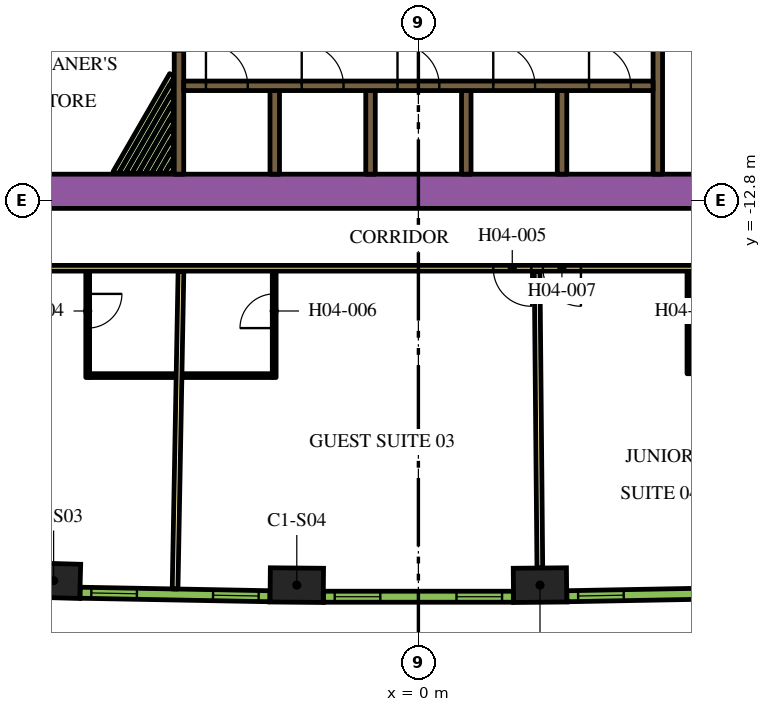
"""IFC4 building model, lengths in metres.
Left out: names, types, materials, properties, quantities, classifications, styles, units other than length and angle.
Written with IfcOpenShell. Run it as: python <this file> out.ifc"""

import sys

from ifc_helpers import new_model, si_unit, direction, frame, frame_2d, origin, origin_2d, place, context, subcontext, project, spatial, rectangle, extrude, element, fill, save


model = new_model("IFC4")
c1 = context("Model", 3, precision=1e-05, world=origin(), true_north=direction((0.0, 1.0)))
c2 = subcontext(c1, "Body", "Model", "MODEL_VIEW")
j1 = project(units=[si_unit("LENGTHUNIT", "METRE"), si_unit("PLANEANGLEUNIT", "RADIAN")], contexts=[c1])
p1 = place(None, origin())
s1 = spatial("IfcSite", under=j1, at=p1, CompositionType="ELEMENT")
p2 = place(p1, origin())
s2 = spatial("IfcBuilding", under=s1, at=p2, CompositionType="ELEMENT")
p3 = place(p2, frame((0.0, 0.0, 70.5)))
s3 = spatial("IfcBuildingStorey", under=s2, at=p3, CompositionType="ELEMENT", Elevation=70.5)
for number, where, z_axis, x_axis in (
    (1, (-9.599, -22.795, 0.0), (0.0, 0.0, 1.0), (1.0, -0.028, 0.0)),
    (2, (-3.2, -22.913, 0.0), (0.0, 0.0, 1.0), (1.0, -0.009, 0.0)),
    (3, (3.2, -22.913, 0.0), (0.0, 0.0, 1.0), (1.0, 0.009, 0.0)),
):
    element("IfcColumn", number, at=place(p3, frame(where, z_axis=z_axis, x_axis=x_axis)), inside=s3, PredefinedType="COLUMN", context=c2, shape_type="SweptSolid", body=[
        extrude(rectangle(XDim=1.4, YDim=0.9, at=origin_2d()), origin(), (0.0, 0.0, 1.0), 3.9),
    ])
p4 = place(p3, frame((-12.019, -12.55, 0.0), z_axis=(0.0, 0.0, 1.0), x_axis=(1.0, 0.0, 0.0)))
e4 = element("IfcWall", 4, at=p4, inside=s3, PredefinedType="SOLIDWALL", context=c2, shape_type="SweptSolid", body=[
    extrude(rectangle(XDim=21.63, YDim=0.9, at=frame_2d((10.815, 0.0))), origin(), (0.0, 0.0, 1.0), 3.9),
])
p5 = place(p3, frame((12.84, -9.261, 0.0), z_axis=(0.0, 0.0, 1.0), x_axis=(-0.866013990052, 0.500019768644, 0.0)))
e5 = element("IfcWall", 5, at=p5, inside=s3, PredefinedType="SOLIDWALL", context=c2, shape_type="SweptSolid", body=[
    extrude(rectangle(XDim=6.8, YDim=0.25, at=frame_2d((3.4, 0.0))), origin(), (0.0, 0.0, 1.0), 3.9),
])
p6 = place(p3, frame((-12.84, -9.261, 0.0), z_axis=(0.0, 0.0, 1.0), x_axis=(0.866016039709, 0.500016218704, 0.0)))
e6 = element("IfcWall", 6, at=p6, inside=s3, PredefinedType="SOLIDWALL", context=c2, shape_type="SweptSolid", body=[
    extrude(rectangle(XDim=7.05, YDim=0.25, at=frame_2d((3.525, 0.0))), origin(), (0.0, 0.0, 1.0), 3.9),
])
p7 = place(p3, frame((-3.78, -12.1, 0.0), z_axis=(0.0, 0.0, 1.0), x_axis=(0.0, 1.0, 0.0)))
e7 = element("IfcWall", 7, at=p7, inside=s3, PredefinedType="SOLIDWALL", context=c2, shape_type="SweptSolid", body=[
    extrude(rectangle(XDim=2.2, YDim=0.25, at=frame_2d((1.1, 0.0))), origin(), (0.0, 0.0, 1.0), 3.9),
])
p8 = place(p3, frame((-6.3, -12.1, 0.0), z_axis=(0.0, 0.0, 1.0), x_axis=(0.0, 1.0, 0.0)))
e8 = element("IfcWall", 8, at=p8, inside=s3, PredefinedType="SOLIDWALL", context=c2, shape_type="SweptSolid", body=[
    extrude(rectangle(XDim=3.265, YDim=0.25, at=frame_2d((1.632, 0.0))), origin(), (0.0, 0.0, 1.0), 3.9),
])
p9 = place(p3, frame((6.3, -12.1, 0.0), z_axis=(0.0, 0.0, 1.0), x_axis=(0.0, 1.0, 0.0)))
e9 = element("IfcWall", 9, at=p9, inside=s3, PredefinedType="SOLIDWALL", context=c2, shape_type="SweptSolid", body=[
    extrude(rectangle(XDim=3.428, YDim=0.25, at=frame_2d((1.714, 0.0))), origin(), (0.0, 0.0, 1.0), 3.9),
])
for number, where, z_axis, x_axis in (
    (10, (3.78, -12.1, 0.0), (0.0, 0.0, 1.0), (0.0, 1.0, 0.0)),
    (11, (1.26, -12.1, 0.0), (0.0, 0.0, 1.0), (0.0, 1.0, 0.0)),
    (12, (-1.26, -12.1, 0.0), (0.0, 0.0, 1.0), (0.0, 1.0, 0.0)),
):
    element("IfcWall", number, at=place(p3, frame(where, z_axis=z_axis, x_axis=x_axis)), inside=s3, PredefinedType="SOLIDWALL", context=c2, shape_type="SweptSolid", body=[
        extrude(rectangle(XDim=2.2, YDim=0.25, at=frame_2d((1.1, 0.0))), origin(), (0.0, 0.0, 1.0), 3.9),
    ])
p10 = place(p3, frame((-7.968, -12.068, 0.0), z_axis=(0.0, 0.0, 1.0), x_axis=(0.500013701029, 0.866017493347, 0.0)))
e13 = element("IfcWall", 13, at=p10, inside=s3, PredefinedType="PARTITIONING", context=c2, shape_type="SweptSolid", body=[
    extrude(rectangle(XDim=2.975, YDim=0.15, at=frame_2d((1.488, 0.0))), origin(), (0.0, 0.0, 1.0), 2.75),
])
p11 = place(p3, frame((-7.794, -12.068, 0.0), z_axis=(0.0, 0.0, 1.0), x_axis=(0.499985098601, 0.86603400694, 0.0)))
e14 = element("IfcWall", 14, at=p11, inside=s3, PredefinedType="PARTITIONING", context=c2, shape_type="SweptSolid", body=[
    extrude(rectangle(XDim=2.628, YDim=0.15, at=frame_2d((1.314, 0.0))), origin(), (0.0, 0.0, 1.0), 2.75),
])
p12 = place(p3, frame((-7.621, -12.068, 0.0), z_axis=(0.0, 0.0, 1.0), x_axis=(0.500028047758, 0.866009209798, 0.0)))
e15 = element("IfcWall", 15, at=p12, inside=s3, PredefinedType="PARTITIONING", context=c2, shape_type="SweptSolid", body=[
    extrude(rectangle(XDim=2.282, YDim=0.15, at=frame_2d((1.141, 0.0))), origin(), (0.0, 0.0, 1.0), 2.75),
])
p13 = place(p3, frame((-7.448, -12.068, 0.0), z_axis=(0.0, 0.0, 1.0), x_axis=(0.500031751504, 0.866007071269, 0.0)))
e16 = element("IfcWall", 16, at=p13, inside=s3, PredefinedType="PARTITIONING", context=c2, shape_type="SweptSolid", body=[
    extrude(rectangle(XDim=1.936, YDim=0.15, at=frame_2d((0.968, 0.0))), origin(), (0.0, 0.0, 1.0), 2.75),
])
p14 = place(p3, frame((-7.275, -12.068, 0.0), z_axis=(0.0, 0.0, 1.0), x_axis=(0.499988385283, 0.86603210944, 0.0)))
e17 = element("IfcWall", 17, at=p14, inside=s3, PredefinedType="PARTITIONING", context=c2, shape_type="SweptSolid", body=[
    extrude(rectangle(XDim=1.589, YDim=0.15, at=frame_2d((0.795, 0.0))), origin(), (0.0, 0.0, 1.0), 2.75),
])
p15 = place(p3, frame((-7.102, -12.068, 0.0), z_axis=(0.0, 0.0, 1.0), x_axis=(0.500068153333, 0.865986051864, 0.0)))
e18 = element("IfcWall", 18, at=p15, inside=s3, PredefinedType="PARTITIONING", context=c2, shape_type="SweptSolid", body=[
    extrude(rectangle(XDim=1.243, YDim=0.15, at=frame_2d((0.622, 0.0))), origin(), (0.0, 0.0, 1.0), 2.75),
])
p16 = place(p3, frame((-6.928, -12.068, 0.0), z_axis=(0.0, 0.0, 1.0), x_axis=(0.500005339912, 0.866022320763, 0.0)))
e19 = element("IfcWall", 19, at=p16, inside=s3, PredefinedType="PARTITIONING", context=c2, shape_type="SweptSolid", body=[
    extrude(rectangle(XDim=0.896, YDim=0.15, at=frame_2d((0.448, 0.0))), origin(), (0.0, 0.0, 1.0), 2.75),
])
p17 = place(p3, frame((-6.755, -12.068, 0.0), z_axis=(0.0, 0.0, 1.0), x_axis=(0.500196256984, 0.865912065108, 0.0)))
e20 = element("IfcWall", 20, at=p17, inside=s3, PredefinedType="PARTITIONING", context=c2, shape_type="SweptSolid", body=[
    extrude(rectangle(XDim=0.55, YDim=0.15, at=frame_2d((0.275, 0.0))), origin(), (0.0, 0.0, 1.0), 2.75),
])
p18 = place(p3, frame((-6.582, -12.068, 0.0), z_axis=(0.0, 0.0, 1.0), x_axis=(0.499618727529, 0.866245419672, 0.0)))
e21 = element("IfcWall", 21, at=p18, inside=s3, PredefinedType="PARTITIONING", context=c2, shape_type="SweptSolid", body=[
    extrude(rectangle(XDim=0.204, YDim=0.15, at=frame_2d((0.102, 0.0))), origin(), (0.0, 0.0, 1.0), 2.75),
])
p19 = place(p3, frame((-6.175, -9.775, 0.0), z_axis=(0.0, 0.0, 1.0), x_axis=(1.0, 0.0, 0.0)))
e22 = element("IfcWall", 22, at=p19, inside=s3, PredefinedType="SOLIDWALL", context=c2, shape_type="SweptSolid", body=[
    extrude(rectangle(XDim=12.35, YDim=0.25, at=frame_2d((6.175, 0.0))), origin(), (0.0, 0.0, 1.0), 3.9),
])
p20 = place(p19, frame((0.585, 0.0, 0.0)))
e23 = element("IfcOpeningElement", 23, at=p20, cuts=e22, PredefinedType="OPENING", context=c2, shape_type="SweptSolid", body=[
    extrude(rectangle(XDim=1.1, YDim=2.1, at=frame_2d((0.55, 1.05))), frame((0.0, 0.135, 0.0), z_axis=(0.0, -1.0, 0.0), x_axis=(1.0, 0.0, 0.0)), (0.0, 0.0, 1.0), 0.27),
])
p21 = place(p19, frame((3.105, 0.0, 0.0)))
e24 = element("IfcOpeningElement", 24, at=p21, cuts=e22, PredefinedType="OPENING", context=c2, shape_type="SweptSolid", body=[
    extrude(rectangle(XDim=1.1, YDim=2.1, at=frame_2d((0.55, 1.05))), frame((0.0, 0.135, 0.0), z_axis=(0.0, -1.0, 0.0), x_axis=(1.0, 0.0, 0.0)), (0.0, 0.0, 1.0), 0.27),
])
p22 = place(p19, frame((5.625, 0.0, 0.0)))
e25 = element("IfcOpeningElement", 25, at=p22, cuts=e22, PredefinedType="OPENING", context=c2, shape_type="SweptSolid", body=[
    extrude(rectangle(XDim=1.1, YDim=2.1, at=frame_2d((0.55, 1.05))), frame((0.0, 0.135, 0.0), z_axis=(0.0, -1.0, 0.0), x_axis=(1.0, 0.0, 0.0)), (0.0, 0.0, 1.0), 0.27),
])
p23 = place(p19, frame((8.145, 0.0, 0.0)))
e26 = element("IfcOpeningElement", 26, at=p23, cuts=e22, PredefinedType="OPENING", context=c2, shape_type="SweptSolid", body=[
    extrude(rectangle(XDim=1.1, YDim=2.1, at=frame_2d((0.55, 1.05))), frame((0.0, 0.135, 0.0), z_axis=(0.0, -1.0, 0.0), x_axis=(1.0, 0.0, 0.0)), (0.0, 0.0, 1.0), 0.27),
])
p24 = place(p19, frame((10.665, 0.0, 0.0)))
e27 = element("IfcOpeningElement", 27, at=p24, cuts=e22, PredefinedType="OPENING", context=c2, shape_type="SweptSolid", body=[
    extrude(rectangle(XDim=1.1, YDim=2.1, at=frame_2d((0.55, 1.05))), frame((0.0, 0.135, 0.0), z_axis=(0.0, -1.0, 0.0), x_axis=(1.0, 0.0, 0.0)), (0.0, 0.0, 1.0), 0.27),
])
p25 = place(p3, frame((12.918, -14.575, 0.0), z_axis=(0.0, 0.0, 1.0), x_axis=(-1.0, 0.0, 0.0)))
e28 = element("IfcWall", 28, at=p25, inside=s3, PredefinedType="PARTITIONING", context=c2, shape_type="SweptSolid", body=[
    extrude(rectangle(XDim=25.766, YDim=0.15, at=frame_2d((12.883, 0.0))), origin(), (0.0, 0.0, 1.0), 2.75),
])
p26 = place(p25, frame((24.586, 0.0, 0.0)))
e29 = element("IfcOpeningElement", 29, at=p26, cuts=e28, PredefinedType="OPENING", context=c2, shape_type="SweptSolid", body=[
    extrude(rectangle(XDim=1.0, YDim=2.1, at=frame_2d((0.5, 1.05))), frame((0.0, 0.085, 0.0), z_axis=(0.0, -1.0, 0.0), x_axis=(1.0, 0.0, 0.0)), (0.0, 0.0, 1.0), 0.17),
])
p27 = place(p25, frame((9.948, 0.0, 0.0)))
e30 = element("IfcOpeningElement", 30, at=p27, cuts=e28, PredefinedType="OPENING", context=c2, shape_type="SweptSolid", body=[
    extrude(rectangle(XDim=1.0, YDim=2.1, at=frame_2d((0.5, 1.05))), frame((0.0, 0.085, 0.0), z_axis=(0.0, -1.0, 0.0), x_axis=(1.0, 0.0, 0.0)), (0.0, 0.0, 1.0), 0.17),
])
p28 = place(p25, frame((8.642, 0.0, 0.0)))
e31 = element("IfcOpeningElement", 31, at=p28, cuts=e28, PredefinedType="OPENING", context=c2, shape_type="SweptSolid", body=[
    extrude(rectangle(XDim=1.0, YDim=2.1, at=frame_2d((0.5, 1.05))), frame((0.0, 0.085, 0.0), z_axis=(0.0, -1.0, 0.0), x_axis=(1.0, 0.0, 0.0)), (0.0, 0.0, 1.0), 0.17),
])
p29 = place(p25, frame((0.18, 0.0, 0.0)))
e32 = element("IfcOpeningElement", 32, at=p29, cuts=e28, PredefinedType="OPENING", context=c2, shape_type="SweptSolid", body=[
    extrude(rectangle(XDim=1.0, YDim=2.1, at=frame_2d((0.5, 1.05))), frame((0.0, 0.085, 0.0), z_axis=(0.0, -1.0, 0.0), x_axis=(1.0, 0.0, 0.0)), (0.0, 0.0, 1.0), 0.17),
])
p30 = place(p3, frame((-6.402, -23.014, 0.0), z_axis=(0.0, 0.0, 1.0), x_axis=(0.01849587109, 0.999828936745, 0.0)))
e33 = element("IfcWall", 33, at=p30, inside=s3, PredefinedType="PARTITIONING", context=c2, shape_type="SweptSolid", body=[
    extrude(rectangle(XDim=8.355, YDim=0.15, at=frame_2d((4.178, 0.0))), origin(), (0.0, 0.0, 1.0), 2.75),
])
p31 = place(p3, frame((3.196, -22.463, 0.0), z_axis=(0.0, 0.0, 1.0), x_axis=(-0.00926060032, 0.999957119721, 0.0)))
e34 = element("IfcWall", 34, at=p31, inside=s3, PredefinedType="PARTITIONING", context=c2, shape_type="SweptSolid", body=[
    extrude(rectangle(XDim=7.803, YDim=0.15, at=frame_2d((3.902, 0.0))), origin(), (0.0, 0.0, 1.0), 2.75),
])
p32 = place(p3, frame((-8.702, -14.65, 0.0), z_axis=(0.0, 0.0, 1.0), x_axis=(0.0, -1.0, 0.0)))
e35 = element("IfcWall", 35, at=p32, inside=s3, PredefinedType="PARTITIONING", context=c2, shape_type="SweptSolid", body=[
    extrude(rectangle(XDim=2.8, YDim=0.1, at=frame_2d((1.4, 0.0))), origin(), (0.0, 0.0, 1.0), 2.75),
])
p33 = place(p32, frame((0.6, 0.0, 0.0)))
e36 = element("IfcOpeningElement", 36, at=p33, cuts=e35, PredefinedType="OPENING", context=c2, shape_type="SweptSolid", body=[
    extrude(rectangle(XDim=0.9, YDim=2.1, at=frame_2d((0.45, 1.05))), frame((0.0, 0.06, 0.0), z_axis=(0.0, -1.0, 0.0), x_axis=(1.0, 0.0, 0.0)), (0.0, 0.0, 1.0), 0.12),
])
p34 = place(p3, frame((-8.652, -17.4, 0.0), z_axis=(0.0, 0.0, 1.0), x_axis=(1.0, 0.0, 0.0)))
e37 = element("IfcWall", 37, at=p34, inside=s3, PredefinedType="PARTITIONING", context=c2, shape_type="SweptSolid", body=[
    extrude(rectangle(XDim=2.27, YDim=0.1, at=frame_2d((1.135, 0.0))), origin(), (0.0, 0.0, 1.0), 2.75),
])
p35 = place(p3, frame((-3.794, -17.45, 0.0), z_axis=(0.0, 0.0, 1.0), x_axis=(0.0, 1.0, 0.0)))
e38 = element("IfcWall", 38, at=p35, inside=s3, PredefinedType="PARTITIONING", context=c2, shape_type="SweptSolid", body=[
    extrude(rectangle(XDim=2.8, YDim=0.1, at=frame_2d((1.4, 0.0))), origin(), (0.0, 0.0, 1.0), 2.75),
])
p36 = place(p35, frame((1.3, 0.0, 0.0)))
e39 = element("IfcOpeningElement", 39, at=p36, cuts=e38, PredefinedType="OPENING", context=c2, shape_type="SweptSolid", body=[
    extrude(rectangle(XDim=0.9, YDim=2.1, at=frame_2d((0.45, 1.05))), frame((0.0, 0.06, 0.0), z_axis=(0.0, -1.0, 0.0), x_axis=(1.0, 0.0, 0.0)), (0.0, 0.0, 1.0), 0.12),
])
p37 = place(p3, frame((-3.844, -17.4, 0.0), z_axis=(0.0, 0.0, 1.0), x_axis=(-1.0, 0.0, 0.0)))
e40 = element("IfcWall", 40, at=p37, inside=s3, PredefinedType="PARTITIONING", context=c2, shape_type="SweptSolid", body=[
    extrude(rectangle(XDim=2.37, YDim=0.1, at=frame_2d((1.185, 0.0))), origin(), (0.0, 0.0, 1.0), 2.75),
])
p38 = place(p3, frame((7.119, -14.65, 0.0), z_axis=(0.0, 0.0, 1.0), x_axis=(0.0, -1.0, 0.0)))
e41 = element("IfcWall", 41, at=p38, inside=s3, PredefinedType="PARTITIONING", context=c2, shape_type="SweptSolid", body=[
    extrude(rectangle(XDim=2.7, YDim=0.1, at=frame_2d((1.35, 0.0))), origin(), (0.0, 0.0, 1.0), 2.75),
])
p39 = place(p38, frame((0.6, 0.0, 0.0)))
e42 = element("IfcOpeningElement", 42, at=p39, cuts=e41, PredefinedType="OPENING", context=c2, shape_type="SweptSolid", body=[
    extrude(rectangle(XDim=0.9, YDim=2.1, at=frame_2d((0.45, 1.05))), frame((0.0, 0.06, 0.0), z_axis=(0.0, -1.0, 0.0), x_axis=(1.0, 0.0, 0.0)), (0.0, 0.0, 1.0), 0.12),
])
p40 = place(p3, frame((7.169, -17.3, 0.0), z_axis=(0.0, 0.0, 1.0), x_axis=(1.0, 0.0, 0.0)))
e43 = element("IfcWall", 43, at=p40, inside=s3, PredefinedType="PARTITIONING", context=c2, shape_type="SweptSolid", body=[
    extrude(rectangle(XDim=2.2, YDim=0.1, at=frame_2d((1.1, 0.0))), origin(), (0.0, 0.0, 1.0), 2.75),
])
p41 = place(p3, frame((-8.904, -23.113, 0.0), z_axis=(0.0, 0.0, 1.0), x_axis=(0.999829529479, -0.018463801951, 0.0)))
e44 = element("IfcWall", 44, at=p41, inside=s3, PredefinedType="SOLIDWALL", context=c2, shape_type="SweptSolid", body=[
    extrude(rectangle(XDim=4.998, YDim=0.29, at=frame_2d((2.499, 0.0))), origin(), (0.0, 0.0, 1.0), 3.65),
])
p42 = place(p41, frame((0.297, 0.0, 0.9)))
e45 = element("IfcOpeningElement", 45, at=p42, cuts=e44, PredefinedType="OPENING", context=c2, shape_type="SweptSolid", body=[
    extrude(rectangle(XDim=1.2, YDim=2.15, at=frame_2d((0.6, 1.075))), frame((0.0, 0.155, 0.0), z_axis=(0.0, -1.0, 0.0), x_axis=(1.0, 0.0, 0.0)), (0.0, 0.0, 1.0), 0.31),
])
p43 = place(p41, frame((3.501, 0.0, 0.9)))
e46 = element("IfcOpeningElement", 46, at=p43, cuts=e44, PredefinedType="OPENING", context=c2, shape_type="SweptSolid", body=[
    extrude(rectangle(XDim=1.2, YDim=2.15, at=frame_2d((0.6, 1.075))), frame((0.0, 0.155, 0.0), z_axis=(0.0, -1.0, 0.0), x_axis=(1.0, 0.0, 0.0)), (0.0, 0.0, 1.0), 0.31),
])
p44 = place(p3, frame((-2.499, -23.218, 0.0), z_axis=(0.0, 0.0, 1.0), x_axis=(1.0, 0.0, 0.0)))
e47 = element("IfcWall", 47, at=p44, inside=s3, PredefinedType="SOLIDWALL", context=c2, shape_type="SweptSolid", body=[
    extrude(rectangle(XDim=4.998, YDim=0.29, at=frame_2d((2.499, 0.0))), origin(), (0.0, 0.0, 1.0), 3.65),
])
p45 = place(p44, frame((0.297, 0.0, 0.9)))
e48 = element("IfcOpeningElement", 48, at=p45, cuts=e47, PredefinedType="OPENING", context=c2, shape_type="SweptSolid", body=[
    extrude(rectangle(XDim=1.2, YDim=2.15, at=frame_2d((0.6, 1.075))), frame((0.0, 0.155, 0.0), z_axis=(0.0, -1.0, 0.0), x_axis=(1.0, 0.0, 0.0)), (0.0, 0.0, 1.0), 0.31),
])
p46 = place(p44, frame((3.501, 0.0, 0.9)))
e49 = element("IfcOpeningElement", 49, at=p46, cuts=e47, PredefinedType="OPENING", context=c2, shape_type="SweptSolid", body=[
    extrude(rectangle(XDim=1.2, YDim=2.15, at=frame_2d((0.6, 1.075))), frame((0.0, 0.155, 0.0), z_axis=(0.0, -1.0, 0.0), x_axis=(1.0, 0.0, 0.0)), (0.0, 0.0, 1.0), 0.31),
])
p47 = place(p3, frame((3.906, -23.205, 0.0), z_axis=(0.0, 0.0, 1.0), x_axis=(0.999829529479, 0.018463801951, 0.0)))
e50 = element("IfcWall", 50, at=p47, inside=s3, PredefinedType="SOLIDWALL", context=c2, shape_type="SweptSolid", body=[
    extrude(rectangle(XDim=4.998, YDim=0.29, at=frame_2d((2.499, 0.0))), origin(), (0.0, 0.0, 1.0), 3.65),
])
p48 = place(p47, frame((0.297, 0.0, 0.9)))
e51 = element("IfcOpeningElement", 51, at=p48, cuts=e50, PredefinedType="OPENING", context=c2, shape_type="SweptSolid", body=[
    extrude(rectangle(XDim=1.2, YDim=2.15, at=frame_2d((0.6, 1.075))), frame((0.0, 0.155, 0.0), z_axis=(0.0, -1.0, 0.0), x_axis=(1.0, 0.0, 0.0)), (0.0, 0.0, 1.0), 0.31),
])
p49 = place(p47, frame((3.501, 0.0, 0.9)))
e52 = element("IfcOpeningElement", 52, at=p49, cuts=e50, PredefinedType="OPENING", context=c2, shape_type="SweptSolid", body=[
    extrude(rectangle(XDim=1.2, YDim=2.15, at=frame_2d((0.6, 1.075))), frame((0.0, 0.155, 0.0), z_axis=(0.0, -1.0, 0.0), x_axis=(1.0, 0.0, 0.0)), (0.0, 0.0, 1.0), 0.31),
])
p50 = place(p20, origin())
e53 = element("IfcDoor", 53, at=p50, inside=s3, OperationType="DOUBLE_DOOR_SLIDING", PredefinedType="DOOR", context=c2, shape_type="SweptSolid", body=[
    extrude(rectangle(XDim=1.1, YDim=2.1, at=frame_2d((0.55, 1.05))), frame((0.0, 0.025, 0.0), z_axis=(0.0, -1.0, 0.0), x_axis=(1.0, 0.0, 0.0)), (0.0, 0.0, 1.0), 0.05),
])
fill(e23, e53)
p51 = place(p21, origin())
e54 = element("IfcDoor", 54, at=p51, inside=s3, OperationType="DOUBLE_DOOR_SLIDING", PredefinedType="DOOR", context=c2, shape_type="SweptSolid", body=[
    extrude(rectangle(XDim=1.1, YDim=2.1, at=frame_2d((0.55, 1.05))), frame((0.0, 0.025, 0.0), z_axis=(0.0, -1.0, 0.0), x_axis=(1.0, 0.0, 0.0)), (0.0, 0.0, 1.0), 0.05),
])
fill(e24, e54)
p52 = place(p22, origin())
e55 = element("IfcDoor", 55, at=p52, inside=s3, OperationType="DOUBLE_DOOR_SLIDING", PredefinedType="DOOR", context=c2, shape_type="SweptSolid", body=[
    extrude(rectangle(XDim=1.1, YDim=2.1, at=frame_2d((0.55, 1.05))), frame((0.0, 0.025, 0.0), z_axis=(0.0, -1.0, 0.0), x_axis=(1.0, 0.0, 0.0)), (0.0, 0.0, 1.0), 0.05),
])
fill(e25, e55)
p53 = place(p23, origin())
e56 = element("IfcDoor", 56, at=p53, inside=s3, OperationType="DOUBLE_DOOR_SLIDING", PredefinedType="DOOR", context=c2, shape_type="SweptSolid", body=[
    extrude(rectangle(XDim=1.1, YDim=2.1, at=frame_2d((0.55, 1.05))), frame((0.0, 0.025, 0.0), z_axis=(0.0, -1.0, 0.0), x_axis=(1.0, 0.0, 0.0)), (0.0, 0.0, 1.0), 0.05),
])
fill(e26, e56)
p54 = place(p24, origin())
e57 = element("IfcDoor", 57, at=p54, inside=s3, OperationType="DOUBLE_DOOR_SLIDING", PredefinedType="DOOR", context=c2, shape_type="SweptSolid", body=[
    extrude(rectangle(XDim=1.1, YDim=2.1, at=frame_2d((0.55, 1.05))), frame((0.0, 0.025, 0.0), z_axis=(0.0, -1.0, 0.0), x_axis=(1.0, 0.0, 0.0)), (0.0, 0.0, 1.0), 0.05),
])
fill(e27, e57)
p55 = place(p33, origin())
e58 = element("IfcDoor", 58, at=p55, inside=s3, OperationType="SINGLE_SWING_LEFT", PredefinedType="DOOR", context=c2, shape_type="SweptSolid", body=[
    extrude(rectangle(XDim=0.9, YDim=2.1, at=frame_2d((0.45, 1.05))), frame((0.0, 0.025, 0.0), z_axis=(0.0, -1.0, 0.0), x_axis=(1.0, 0.0, 0.0)), (0.0, 0.0, 1.0), 0.05),
])
fill(e36, e58)
p56 = place(p27, origin())
e59 = element("IfcDoor", 59, at=p56, inside=s3, OperationType="SINGLE_SWING_LEFT", PredefinedType="DOOR", context=c2, shape_type="SweptSolid", body=[
    extrude(rectangle(XDim=1.0, YDim=2.1, at=frame_2d((0.5, 1.05))), frame((0.0, 0.025, 0.0), z_axis=(0.0, -1.0, 0.0), x_axis=(1.0, 0.0, 0.0)), (0.0, 0.0, 1.0), 0.05),
])
fill(e30, e59)
p57 = place(p36, origin())
e60 = element("IfcDoor", 60, at=p57, inside=s3, OperationType="SINGLE_SWING_RIGHT", PredefinedType="DOOR", context=c2, shape_type="SweptSolid", body=[
    extrude(rectangle(XDim=0.9, YDim=2.1, at=frame_2d((0.45, 1.05))), frame((0.0, 0.025, 0.0), z_axis=(0.0, -1.0, 0.0), x_axis=(1.0, 0.0, 0.0)), (0.0, 0.0, 1.0), 0.05),
])
fill(e39, e60)
p58 = place(p28, origin())
e61 = element("IfcDoor", 61, at=p58, inside=s3, OperationType="SINGLE_SWING_RIGHT", PredefinedType="DOOR", context=c2, shape_type="SweptSolid", body=[
    extrude(rectangle(XDim=1.0, YDim=2.1, at=frame_2d((0.5, 1.05))), frame((0.0, 0.025, 0.0), z_axis=(0.0, -1.0, 0.0), x_axis=(1.0, 0.0, 0.0)), (0.0, 0.0, 1.0), 0.05),
])
fill(e31, e61)
p59 = place(p39, origin())
e62 = element("IfcDoor", 62, at=p59, inside=s3, OperationType="SINGLE_SWING_LEFT", PredefinedType="DOOR", context=c2, shape_type="SweptSolid", body=[
    extrude(rectangle(XDim=0.9, YDim=2.1, at=frame_2d((0.45, 1.05))), frame((0.0, 0.025, 0.0), z_axis=(0.0, -1.0, 0.0), x_axis=(1.0, 0.0, 0.0)), (0.0, 0.0, 1.0), 0.05),
])
fill(e42, e62)
p60 = place(p42, origin())
e63 = element("IfcWindow", 63, at=p60, inside=s3, PartitioningType="DOUBLE_PANEL_VERTICAL", PredefinedType="WINDOW", context=c2, shape_type="SweptSolid", body=[
    extrude(rectangle(XDim=1.2, YDim=2.15, at=frame_2d((0.6, 1.075))), frame((0.0, 0.015, 0.0), z_axis=(0.0, -1.0, 0.0), x_axis=(1.0, 0.0, 0.0)), (0.0, 0.0, 1.0), 0.06),
])
fill(e45, e63)
p61 = place(p43, origin())
e64 = element("IfcWindow", 64, at=p61, inside=s3, PartitioningType="DOUBLE_PANEL_VERTICAL", PredefinedType="WINDOW", context=c2, shape_type="SweptSolid", body=[
    extrude(rectangle(XDim=1.2, YDim=2.15, at=frame_2d((0.6, 1.075))), frame((0.0, 0.015, 0.0), z_axis=(0.0, -1.0, 0.0), x_axis=(1.0, 0.0, 0.0)), (0.0, 0.0, 1.0), 0.06),
])
fill(e46, e64)
p62 = place(p45, origin())
e65 = element("IfcWindow", 65, at=p62, inside=s3, PartitioningType="DOUBLE_PANEL_VERTICAL", PredefinedType="WINDOW", context=c2, shape_type="SweptSolid", body=[
    extrude(rectangle(XDim=1.2, YDim=2.15, at=frame_2d((0.6, 1.075))), frame((0.0, 0.015, 0.0), z_axis=(0.0, -1.0, 0.0), x_axis=(1.0, 0.0, 0.0)), (0.0, 0.0, 1.0), 0.06),
])
fill(e48, e65)
p63 = place(p46, origin())
e66 = element("IfcWindow", 66, at=p63, inside=s3, PartitioningType="DOUBLE_PANEL_VERTICAL", PredefinedType="WINDOW", context=c2, shape_type="SweptSolid", body=[
    extrude(rectangle(XDim=1.2, YDim=2.15, at=frame_2d((0.6, 1.075))), frame((0.0, 0.015, 0.0), z_axis=(0.0, -1.0, 0.0), x_axis=(1.0, 0.0, 0.0)), (0.0, 0.0, 1.0), 0.06),
])
fill(e49, e66)
p64 = place(p48, origin())
e67 = element("IfcWindow", 67, at=p64, inside=s3, PartitioningType="DOUBLE_PANEL_VERTICAL", PredefinedType="WINDOW", context=c2, shape_type="SweptSolid", body=[
    extrude(rectangle(XDim=1.2, YDim=2.15, at=frame_2d((0.6, 1.075))), frame((0.0, 0.015, 0.0), z_axis=(0.0, -1.0, 0.0), x_axis=(1.0, 0.0, 0.0)), (0.0, 0.0, 1.0), 0.06),
])
fill(e51, e67)
save(model, sys.argv[1])
